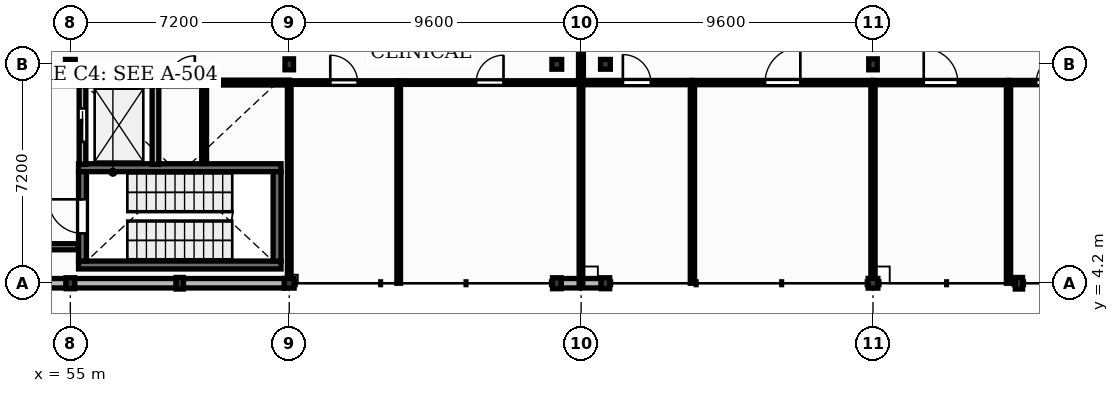
"""IFC4 building model, lengths in metres.
Left out: names, types, materials, properties, quantities, classifications, styles, units other than length and angle.
Written with IfcOpenShell. Run it as: python <this file> out.ifc"""

import sys

from ifc_helpers import new_model, si_unit, direction, frame, frame_2d, origin, origin_2d, place, context, subcontext, project, spatial, rectangle, extrude, element, fill, save


model = new_model("IFC4")
c1 = context("Model", 3, precision=1e-05, world=origin(), true_north=direction((0.0, 1.0)))
c2 = subcontext(c1, "Body", "Model", "MODEL_VIEW")
j1 = project(units=[si_unit("LENGTHUNIT", "METRE"), si_unit("PLANEANGLEUNIT", "RADIAN")], contexts=[c1])
p1 = place(None, origin())
s1 = spatial("IfcSite", under=j1, at=p1, CompositionType="ELEMENT")
p2 = place(p1, origin())
s2 = spatial("IfcBuilding", under=s1, at=p2, CompositionType="ELEMENT")
p3 = place(p2, frame((0.0, 0.0, 9.0)))
s3 = spatial("IfcBuildingStorey", under=s2, at=p3, CompositionType="ELEMENT", Elevation=9.0)
p4 = place(p3, frame((72.6, 4.2, 0.0), z_axis=(0.0, 0.0, 1.0), x_axis=(1.0, 0.0, 0.0)))
e1 = element("IfcColumn", 1, at=p4, inside=s3, PredefinedType="COLUMN", context=c2, shape_type="SweptSolid", body=[
    extrude(rectangle(XDim=0.28, YDim=0.36, at=origin_2d()), origin(), (0.0, 0.0, 1.0), 3.99),
])
for number, where, z_axis, x_axis in (
    (2, (72.6, 11.4, 0.0), (0.0, 0.0, 1.0), (1.0, 0.0, 0.0)),
    (3, (81.4, 4.2, 0.0), (0.0, 0.0, 1.0), (1.0, 0.0, 0.0)),
):
    element("IfcColumn", number, at=place(p3, frame(where, z_axis=z_axis, x_axis=x_axis)), inside=s3, PredefinedType="COLUMN", context=c2, shape_type="SweptSolid", body=[
        extrude(rectangle(XDim=0.32, YDim=0.32, at=origin_2d()), origin(), (0.0, 0.0, 1.0), 3.99),
    ])
for number, where, z_axis, x_axis in (
    (4, (81.4, 11.4, 0.0), (0.0, 0.0, 1.0), (1.0, 0.0, 0.0)),
    (5, (55.0, 4.2, 0.0), (0.0, 0.0, 1.0), (1.0, 0.0, 0.0)),
):
    element("IfcColumn", number, at=place(p3, frame(where, z_axis=z_axis, x_axis=x_axis)), inside=s3, PredefinedType="COLUMN", context=c2, shape_type="SweptSolid", body=[
        extrude(rectangle(XDim=0.28, YDim=0.36, at=origin_2d()), origin(), (0.0, 0.0, 1.0), 3.99),
    ])
for number, where, z_axis, x_axis in (
    (6, (55.0, 11.4, 0.0), (0.0, 0.0, 1.0), (1.0, 0.0, 0.0)),
    (7, (62.2, 4.2, 0.0), (0.0, 0.0, 1.0), (1.0, 0.0, 0.0)),
):
    element("IfcColumn", number, at=place(p3, frame(where, z_axis=z_axis, x_axis=x_axis)), inside=s3, PredefinedType="COLUMN", context=c2, shape_type="SweptSolid", body=[
        extrude(rectangle(XDim=0.32, YDim=0.32, at=origin_2d()), origin(), (0.0, 0.0, 1.0), 3.99),
    ])
for number, where, z_axis, x_axis in (
    (8, (62.2, 11.4, 0.0), (0.0, 0.0, 1.0), (1.0, 0.0, 0.0)),
    (9, (71.0, 4.2, 0.0), (0.0, 0.0, 1.0), (1.0, 0.0, 0.0)),
):
    element("IfcColumn", number, at=place(p3, frame(where, z_axis=z_axis, x_axis=x_axis)), inside=s3, PredefinedType="COLUMN", context=c2, shape_type="SweptSolid", body=[
        extrude(rectangle(XDim=0.28, YDim=0.36, at=origin_2d()), origin(), (0.0, 0.0, 1.0), 3.99),
    ])
p5 = place(p3, frame((71.0, 11.4, 0.0), z_axis=(0.0, 0.0, 1.0), x_axis=(1.0, 0.0, 0.0)))
e10 = element("IfcColumn", 10, at=p5, inside=s3, PredefinedType="COLUMN", context=c2, shape_type="SweptSolid", body=[
    extrude(rectangle(XDim=0.32, YDim=0.32, at=origin_2d()), origin(), (0.0, 0.0, 1.0), 3.99),
])
for number, where, z_axis, x_axis in (
    (11, (58.6, 4.2, 0.0), (0.0, 0.0, 1.0), (1.0, 0.0, 0.0)),
    (12, (86.2, 4.2, 0.0), (0.0, 0.0, 1.0), (1.0, 0.0, 0.0)),
):
    element("IfcColumn", number, at=place(p3, frame(where, z_axis=z_axis, x_axis=x_axis)), inside=s3, PredefinedType="PILASTER", context=c2, shape_type="SweptSolid", body=[
        extrude(rectangle(XDim=0.24, YDim=0.38, at=origin_2d()), origin(), (0.0, 0.0, 1.0), 3.99),
    ])
p6 = place(p3, frame((51.52, 4.2, 0.0), z_axis=(0.0, 0.0, 1.0), x_axis=(1.0, 0.0, 0.0)))
e13 = element("IfcWall", 13, at=p6, inside=s3, PredefinedType="SOLIDWALL", context=c2, shape_type="SweptSolid", body=[
    extrude(rectangle(XDim=3.34, YDim=0.31, at=frame_2d((1.67, 0.0))), origin(), (0.0, 0.0, 1.0), 3.53),
])
p7 = place(p6, frame((0.83, 0.0, 1.5)))
e14 = element("IfcOpeningElement", 14, at=p7, cuts=e13, PredefinedType="OPENING", context=c2, shape_type="SweptSolid", body=[
    extrude(rectangle(XDim=1.68, YDim=1.25, at=frame_2d((0.84, 0.625))), frame((0.0, 0.165, 0.0), z_axis=(0.0, -1.0, 0.0), x_axis=(1.0, 0.0, 0.0)), (0.0, 0.0, 1.0), 0.33),
])
p8 = place(p3, frame((55.14, 4.2, 0.0), z_axis=(0.0, 0.0, 1.0), x_axis=(1.0, 0.0, 0.0)))
e15 = element("IfcWall", 15, at=p8, inside=s3, PredefinedType="SOLIDWALL", context=c2, shape_type="SweptSolid", body=[
    extrude(rectangle(XDim=3.34, YDim=0.31, at=frame_2d((1.67, 0.0))), origin(), (0.0, 0.0, 1.0), 3.53),
])
p9 = place(p3, frame((58.72, 4.2, 0.0), z_axis=(0.0, 0.0, 1.0), x_axis=(1.0, 0.0, 0.0)))
e16 = element("IfcWall", 16, at=p9, inside=s3, PredefinedType="SOLIDWALL", context=c2, shape_type="SweptSolid", body=[
    extrude(rectangle(XDim=3.32, YDim=0.31, at=frame_2d((1.66, 0.0))), origin(), (0.0, 0.0, 1.0), 3.53),
])
p10 = place(p3, frame((71.14, 4.2, 0.0), z_axis=(0.0, 0.0, 1.0), x_axis=(1.0, 0.0, 0.0)))
e17 = element("IfcWall", 17, at=p10, inside=s3, PredefinedType="SOLIDWALL", context=c2, shape_type="SweptSolid", body=[
    extrude(rectangle(XDim=0.615, YDim=0.31, at=frame_2d((0.308, 0.0))), origin(), (0.0, 0.0, 1.0), 3.99),
])
p11 = place(p3, frame((71.805, 4.2, 0.0), z_axis=(0.0, 0.0, 1.0), x_axis=(1.0, 0.0, 0.0)))
e18 = element("IfcWall", 18, at=p11, inside=s3, PredefinedType="SOLIDWALL", context=c2, shape_type="SweptSolid", body=[
    extrude(rectangle(XDim=0.655, YDim=0.31, at=frame_2d((0.328, 0.0))), origin(), (0.0, 0.0, 1.0), 3.99),
])
for number, where, z_axis, x_axis in (
    (19, (55.27, 4.8, 0.0), (0.0, 0.0, 1.0), (1.0, 0.0, 0.0)),
    (20, (55.27, 8.0, 0.0), (0.0, 0.0, 1.0), (1.0, 0.0, 0.0)),
):
    element("IfcWall", number, at=place(p3, frame(where, z_axis=z_axis, x_axis=x_axis)), inside=s3, PredefinedType="SHEAR", context=c2, shape_type="SweptSolid", body=[
        extrude(rectangle(XDim=6.66, YDim=0.26, at=frame_2d((3.33, 0.0))), origin(), (0.0, 0.0, 1.0), 3.95),
    ])
p12 = place(p3, frame((55.4, 4.93, 0.0), z_axis=(0.0, 0.0, 1.0), x_axis=(0.0, 1.0, 0.0)))
e21 = element("IfcWall", 21, at=p12, inside=s3, PredefinedType="SHEAR", context=c2, shape_type="SweptSolid", body=[
    extrude(rectangle(XDim=2.94, YDim=0.26, at=frame_2d((1.47, 0.0))), origin(), (0.0, 0.0, 1.0), 3.95),
])
p13 = place(p12, frame((0.91, 0.0, 0.0)))
e22 = element("IfcOpeningElement", 22, at=p13, cuts=e21, PredefinedType="OPENING", context=c2, shape_type="SweptSolid", body=[
    extrude(rectangle(XDim=1.12, YDim=2.1, at=frame_2d((0.56, 1.05))), frame((0.0, 0.14, 0.0), z_axis=(0.0, -1.0, 0.0), x_axis=(1.0, 0.0, 0.0)), (0.0, 0.0, 1.0), 0.28),
])
p14 = place(p3, frame((61.8, 4.93, 0.0), z_axis=(0.0, 0.0, 1.0), x_axis=(0.0, 1.0, 0.0)))
e23 = element("IfcWall", 23, at=p14, inside=s3, PredefinedType="SHEAR", context=c2, shape_type="SweptSolid", body=[
    extrude(rectangle(XDim=2.94, YDim=0.26, at=frame_2d((1.47, 0.0))), origin(), (0.0, 0.0, 1.0), 3.95),
])
p15 = place(p3, frame((55.4, 10.8, 0.0), z_axis=(0.0, 0.0, 1.0), x_axis=(1.0, 0.0, 0.0)))
e24 = element("IfcWall", 24, at=p15, inside=s3, PredefinedType="SOLIDWALL", context=c2, shape_type="SweptSolid", body=[
    extrude(rectangle(XDim=2.4, YDim=0.22, at=frame_2d((1.2, 0.0))), origin(), (0.0, 0.0, 1.0), 3.95),
])
p16 = place(p3, frame((55.4, 8.11, 0.0), z_axis=(0.0, 0.0, 1.0), x_axis=(0.0, 1.0, 0.0)))
e25 = element("IfcWall", 25, at=p16, inside=s3, PredefinedType="SOLIDWALL", context=c2, shape_type="SweptSolid", body=[
    extrude(rectangle(XDim=2.58, YDim=0.22, at=frame_2d((1.29, 0.0))), origin(), (0.0, 0.0, 1.0), 3.95),
])
p17 = place(p16, frame((0.74, 0.0, 0.0)))
e26 = element("IfcOpeningElement", 26, at=p17, cuts=e25, PredefinedType="OPENING", context=c2, shape_type="SweptSolid", body=[
    extrude(rectangle(XDim=1.1, YDim=2.15, at=frame_2d((0.55, 1.075))), frame((0.0, 0.12, 0.0), z_axis=(0.0, -1.0, 0.0), x_axis=(1.0, 0.0, 0.0)), (0.0, 0.0, 1.0), 0.24),
])
p18 = place(p3, frame((57.8, 8.11, 0.0), z_axis=(0.0, 0.0, 1.0), x_axis=(0.0, 1.0, 0.0)))
e27 = element("IfcWall", 27, at=p18, inside=s3, PredefinedType="SOLIDWALL", context=c2, shape_type="SweptSolid", body=[
    extrude(rectangle(XDim=2.58, YDim=0.22, at=frame_2d((1.29, 0.0))), origin(), (0.0, 0.0, 1.0), 3.95),
])
p19 = place(p3, frame((51.0, 10.8, 0.0), z_axis=(0.0, 0.0, 1.0), x_axis=(1.0, 0.0, 0.0)))
e28 = element("IfcWall", 28, at=p19, inside=s3, PredefinedType="PARTITIONING", context=c2, shape_type="SweptSolid", body=[
    extrude(rectangle(XDim=4.29, YDim=0.2, at=frame_2d((2.145, 0.0))), origin(), (0.0, 0.0, 1.0), 3.96),
])
p20 = place(p19, frame((1.405, 0.0, 0.0)))
e29 = element("IfcOpeningElement", 29, at=p20, cuts=e28, PredefinedType="OPENING", context=c2, shape_type="SweptSolid", body=[
    extrude(rectangle(XDim=1.48, YDim=2.25, at=frame_2d((0.74, 1.125))), frame((0.0, 0.11, 0.0), z_axis=(0.0, -1.0, 0.0), x_axis=(1.0, 0.0, 0.0)), (0.0, 0.0, 1.0), 0.22),
])
p21 = place(p3, frame((57.91, 10.8, 0.0), z_axis=(0.0, 0.0, 1.0), x_axis=(1.0, 0.0, 0.0)))
e30 = element("IfcWall", 30, at=p21, inside=s3, PredefinedType="SOLIDWALL", context=c2, shape_type="SweptSolid", body=[
    extrude(rectangle(XDim=1.49, YDim=0.22, at=frame_2d((0.745, 0.0))), origin(), (0.0, 0.0, 1.0), 3.96),
])
p22 = place(p21, frame((0.305, 0.0, 0.0)))
e31 = element("IfcOpeningElement", 31, at=p22, cuts=e30, PredefinedType="OPENING", context=c2, shape_type="SweptSolid", body=[
    extrude(rectangle(XDim=0.88, YDim=2.05, at=frame_2d((0.44, 1.025))), frame((0.0, 0.12, 0.0), z_axis=(0.0, -1.0, 0.0), x_axis=(1.0, 0.0, 0.0)), (0.0, 0.0, 1.0), 0.24),
])
p23 = place(p3, frame((62.2, 10.8, 0.0), z_axis=(0.0, 0.0, 1.0), x_axis=(1.0, 0.0, 0.0)))
e32 = element("IfcWall", 32, at=p23, inside=s3, PredefinedType="PLUMBINGWALL", context=c2, shape_type="SweptSolid", body=[
    extrude(rectangle(XDim=3.6, YDim=0.12, at=frame_2d((1.8, 0.0))), origin(), (0.0, 0.0, 1.0), 3.96),
])
p24 = place(p23, frame((1.35, 0.0, 0.0)))
e33 = element("IfcOpeningElement", 33, at=p24, cuts=e32, PredefinedType="OPENING", context=c2, shape_type="SweptSolid", body=[
    extrude(rectangle(XDim=0.9, YDim=2.1, at=frame_2d((0.45, 1.05))), frame((0.0, 0.07, 0.0), z_axis=(0.0, -1.0, 0.0), x_axis=(1.0, 0.0, 0.0)), (0.0, 0.0, 1.0), 0.14),
])
p25 = place(p3, frame((65.8, 4.2, 0.0), z_axis=(0.0, 0.0, 1.0), x_axis=(0.0, 1.0, 0.0)))
e34 = element("IfcWall", 34, at=p25, inside=s3, PredefinedType="PLUMBINGWALL", context=c2, shape_type="SweptSolid", body=[
    extrude(rectangle(XDim=6.53, YDim=0.12, at=frame_2d((3.265, 0.0))), origin(), (0.0, 0.0, 1.0), 3.96),
])
p26 = place(p3, frame((65.8, 10.8, 0.0), z_axis=(0.0, 0.0, 1.0), x_axis=(1.0, 0.0, 0.0)))
e35 = element("IfcWall", 35, at=p26, inside=s3, PredefinedType="PLUMBINGWALL", context=c2, shape_type="SweptSolid", body=[
    extrude(rectangle(XDim=5.995, YDim=0.12, at=frame_2d((2.998, 0.0))), origin(), (0.0, 0.0, 1.0), 3.96),
])
p27 = place(p26, frame((2.548, 0.0, 0.0)))
e36 = element("IfcOpeningElement", 36, at=p27, cuts=e35, PredefinedType="OPENING", context=c2, shape_type="SweptSolid", body=[
    extrude(rectangle(XDim=0.9, YDim=2.1, at=frame_2d((0.45, 1.05))), frame((0.0, 0.07, 0.0), z_axis=(0.0, -1.0, 0.0), x_axis=(1.0, 0.0, 0.0)), (0.0, 0.0, 1.0), 0.14),
])
p28 = place(p3, frame((71.805, 10.8, 0.0), z_axis=(0.0, 0.0, 1.0), x_axis=(1.0, 0.0, 0.0)))
e37 = element("IfcWall", 37, at=p28, inside=s3, PredefinedType="PARTITIONING", context=c2, shape_type="SweptSolid", body=[
    extrude(rectangle(XDim=3.656, YDim=0.14, at=frame_2d((1.828, 0.0))), origin(), (0.0, 0.0, 1.0), 3.96),
])
p29 = place(p28, frame((1.368, 0.0, 0.0)))
e38 = element("IfcOpeningElement", 38, at=p29, cuts=e37, PredefinedType="OPENING", context=c2, shape_type="SweptSolid", body=[
    extrude(rectangle(XDim=0.92, YDim=2.1, at=frame_2d((0.46, 1.05))), frame((0.0, 0.08, 0.0), z_axis=(0.0, -1.0, 0.0), x_axis=(1.0, 0.0, 0.0)), (0.0, 0.0, 1.0), 0.16),
])
p30 = place(p3, frame((75.461, 4.2, 0.0), z_axis=(0.0, 0.0, 1.0), x_axis=(0.0, 1.0, 0.0)))
e39 = element("IfcWall", 39, at=p30, inside=s3, PredefinedType="PARTITIONING", context=c2, shape_type="SweptSolid", body=[
    extrude(rectangle(XDim=6.53, YDim=0.14, at=frame_2d((3.265, 0.0))), origin(), (0.0, 0.0, 1.0), 3.96),
])
p31 = place(p3, frame((75.461, 10.8, 0.0), z_axis=(0.0, 0.0, 1.0), x_axis=(1.0, 0.0, 0.0)))
e40 = element("IfcWall", 40, at=p31, inside=s3, PredefinedType="PARTITIONING", context=c2, shape_type="SweptSolid", body=[
    extrude(rectangle(XDim=5.939, YDim=0.14, at=frame_2d((2.969, 0.0))), origin(), (0.0, 0.0, 1.0), 3.96),
])
p32 = place(p31, frame((2.389, 0.0, 0.0)))
e41 = element("IfcOpeningElement", 41, at=p32, cuts=e40, PredefinedType="OPENING", context=c2, shape_type="SweptSolid", body=[
    extrude(rectangle(XDim=1.16, YDim=2.1, at=frame_2d((0.58, 1.05))), frame((0.0, 0.08, 0.0), z_axis=(0.0, -1.0, 0.0), x_axis=(1.0, 0.0, 0.0)), (0.0, 0.0, 1.0), 0.16),
])
p33 = place(p3, frame((81.4, 4.36, 0.0), z_axis=(0.0, 0.0, 1.0), x_axis=(0.0, 1.0, 0.0)))
e42 = element("IfcWall", 42, at=p33, inside=s3, PredefinedType="PARTITIONING", context=c2, shape_type="SweptSolid", body=[
    extrude(rectangle(XDim=6.37, YDim=0.14, at=frame_2d((3.185, 0.0))), origin(), (0.0, 0.0, 1.0), 3.47),
])
p34 = place(p3, frame((81.4, 10.8, 0.0), z_axis=(0.0, 0.0, 1.0), x_axis=(1.0, 0.0, 0.0)))
e43 = element("IfcWall", 43, at=p34, inside=s3, PredefinedType="PARTITIONING", context=c2, shape_type="SweptSolid", body=[
    extrude(rectangle(XDim=4.457, YDim=0.14, at=frame_2d((2.229, 0.0))), origin(), (0.0, 0.0, 1.0), 3.96),
])
p35 = place(p34, frame((1.668, 0.0, 0.0)))
e44 = element("IfcOpeningElement", 44, at=p35, cuts=e43, PredefinedType="OPENING", context=c2, shape_type="SweptSolid", body=[
    extrude(rectangle(XDim=1.12, YDim=2.15, at=frame_2d((0.56, 1.075))), frame((0.0, 0.08, 0.0), z_axis=(0.0, -1.0, 0.0), x_axis=(1.0, 0.0, 0.0)), (0.0, 0.0, 1.0), 0.16),
])
p36 = place(p3, frame((85.857, 4.2, 0.0), z_axis=(0.0, 0.0, 1.0), x_axis=(0.0, 1.0, 0.0)))
e45 = element("IfcWall", 45, at=p36, inside=s3, PredefinedType="PARTITIONING", context=c2, shape_type="SweptSolid", body=[
    extrude(rectangle(XDim=6.53, YDim=0.14, at=frame_2d((3.265, 0.0))), origin(), (0.0, 0.0, 1.0), 3.96),
])
p37 = place(p3, frame((85.857, 10.8, 0.0), z_axis=(0.0, 0.0, 1.0), x_axis=(1.0, 0.0, 0.0)))
e46 = element("IfcWall", 46, at=p37, inside=s3, PredefinedType="PARTITIONING", context=c2, shape_type="SweptSolid", body=[
    extrude(rectangle(XDim=2.743, YDim=0.14, at=frame_2d((1.372, 0.0))), origin(), (0.0, 0.0, 1.0), 3.96),
])
p38 = place(p37, frame((0.912, 0.0, 0.0)))
e47 = element("IfcOpeningElement", 47, at=p38, cuts=e46, PredefinedType="OPENING", context=c2, shape_type="SweptSolid", body=[
    extrude(rectangle(XDim=0.92, YDim=2.1, at=frame_2d((0.46, 1.05))), frame((0.0, 0.08, 0.0), z_axis=(0.0, -1.0, 0.0), x_axis=(1.0, 0.0, 0.0)), (0.0, 0.0, 1.0), 0.16),
])
p39 = place(p3, frame((59.4, 8.14, 0.0), z_axis=(0.0, 0.0, 1.0), x_axis=(0.0, 1.0, 0.0)))
e48 = element("IfcWall", 48, at=p39, inside=s3, PredefinedType="PARTITIONING", context=c2, shape_type="SweptSolid", body=[
    extrude(rectangle(XDim=2.59, YDim=0.16, at=frame_2d((1.295, 0.0))), origin(), (0.0, 0.0, 1.0), 3.96),
])
p40 = place(p3, frame((51.0, 5.4, 0.0), z_axis=(0.0, 0.0, 1.0), x_axis=(1.0, 0.0, 0.0)))
e49 = element("IfcWall", 49, at=p40, inside=s3, PredefinedType="PARTITIONING", context=c2, shape_type="SweptSolid", body=[
    extrude(rectangle(XDim=4.26, YDim=0.2, at=frame_2d((2.13, 0.0))), origin(), (0.0, 0.0, 1.0), 3.96),
])
p41 = place(p3, frame((59.4, 10.8, 0.0), z_axis=(0.0, 0.0, 1.0), x_axis=(1.0, 0.0, 0.0)))
e50 = element("IfcWall", 50, at=p41, inside=s3, PredefinedType="PARTITIONING", context=c2, shape_type="SweptSolid", body=[
    extrude(rectangle(XDim=2.8, YDim=0.16, at=frame_2d((1.4, 0.0))), origin(), (0.0, 0.0, 1.0), 3.96),
])
p42 = place(p3, frame((71.795, 10.87, 0.0), z_axis=(0.0, 0.0, 1.0), x_axis=(0.0, 1.0, 0.0)))
e51 = element("IfcWall", 51, at=p42, inside=s3, PredefinedType="PARTITIONING", context=c2, shape_type="SweptSolid", body=[
    extrude(rectangle(XDim=2.46, YDim=0.16, at=frame_2d((1.23, 0.0))), origin(), (0.0, 0.0, 1.0), 3.96),
])
p43 = place(p3, frame((62.2, 4.36, 0.0), z_axis=(0.0, 0.0, 1.0), x_axis=(0.0, 1.0, 0.0)))
e52 = element("IfcWall", 52, at=p43, inside=s3, PredefinedType="PLUMBINGWALL", context=c2, shape_type="SweptSolid", body=[
    extrude(rectangle(XDim=6.37, YDim=0.12, at=frame_2d((3.185, 0.0))), origin(), (0.0, 0.0, 1.0), 3.47),
])
p44 = place(p3, frame((71.795, 4.2, 0.0), z_axis=(0.0, 0.0, 1.0), x_axis=(0.0, 1.0, 0.0)))
e53 = element("IfcWall", 53, at=p44, inside=s3, PredefinedType="PLUMBINGWALL", context=c2, shape_type="SweptSolid", body=[
    extrude(rectangle(XDim=6.53, YDim=0.12, at=frame_2d((3.265, 0.0))), origin(), (0.0, 0.0, 1.0), 3.96),
])
p45 = place(p17, origin())
e54 = element("IfcDoor", 54, at=p45, inside=s3, OperationType="SLIDING_TO_LEFT", PredefinedType="DOOR", context=c2, shape_type="SweptSolid", body=[
    extrude(rectangle(XDim=1.1, YDim=2.15, at=frame_2d((0.55, 1.075))), frame((0.0, 0.025, 0.0), z_axis=(0.0, -1.0, 0.0), x_axis=(1.0, 0.0, 0.0)), (0.0, 0.0, 1.0), 0.05),
])
fill(e26, e54)
p46 = place(p13, origin())
e55 = element("IfcDoor", 55, at=p46, inside=s3, OperationType="SINGLE_SWING_RIGHT", PredefinedType="DOOR", context=c2, shape_type="SweptSolid", body=[
    extrude(rectangle(XDim=1.12, YDim=2.1, at=frame_2d((0.56, 1.05))), frame((0.0, 0.025, 0.0), z_axis=(0.0, -1.0, 0.0), x_axis=(1.0, 0.0, 0.0)), (0.0, 0.0, 1.0), 0.05),
])
fill(e22, e55)
p47 = place(p22, origin())
e56 = element("IfcDoor", 56, at=p47, inside=s3, OperationType="SINGLE_SWING_RIGHT", PredefinedType="DOOR", context=c2, shape_type="SweptSolid", body=[
    extrude(rectangle(XDim=0.88, YDim=2.05, at=frame_2d((0.44, 1.025))), frame((0.0, 0.025, 0.0), z_axis=(0.0, -1.0, 0.0), x_axis=(1.0, 0.0, 0.0)), (0.0, 0.0, 1.0), 0.05),
])
fill(e31, e56)
p48 = place(p24, origin())
e57 = element("IfcDoor", 57, at=p48, inside=s3, OperationType="SINGLE_SWING_LEFT", PredefinedType="DOOR", context=c2, shape_type="SweptSolid", body=[
    extrude(rectangle(XDim=0.9, YDim=2.1, at=frame_2d((0.45, 1.05))), frame((0.0, 0.025, 0.0), z_axis=(0.0, -1.0, 0.0), x_axis=(1.0, 0.0, 0.0)), (0.0, 0.0, 1.0), 0.05),
])
fill(e33, e57)
p49 = place(p27, origin())
e58 = element("IfcDoor", 58, at=p49, inside=s3, OperationType="SINGLE_SWING_RIGHT", PredefinedType="DOOR", context=c2, shape_type="SweptSolid", body=[
    extrude(rectangle(XDim=0.9, YDim=2.1, at=frame_2d((0.45, 1.05))), frame((0.0, 0.025, 0.0), z_axis=(0.0, -1.0, 0.0), x_axis=(1.0, 0.0, 0.0)), (0.0, 0.0, 1.0), 0.05),
])
fill(e36, e58)
p50 = place(p29, origin())
e59 = element("IfcDoor", 59, at=p50, inside=s3, OperationType="SINGLE_SWING_LEFT", PredefinedType="DOOR", context=c2, shape_type="SweptSolid", body=[
    extrude(rectangle(XDim=0.92, YDim=2.1, at=frame_2d((0.46, 1.05))), frame((0.0, 0.025, 0.0), z_axis=(0.0, -1.0, 0.0), x_axis=(1.0, 0.0, 0.0)), (0.0, 0.0, 1.0), 0.05),
])
fill(e38, e59)
p51 = place(p32, origin())
e60 = element("IfcDoor", 60, at=p51, inside=s3, OperationType="SINGLE_SWING_RIGHT", PredefinedType="DOOR", context=c2, shape_type="SweptSolid", body=[
    extrude(rectangle(XDim=1.16, YDim=2.1, at=frame_2d((0.58, 1.05))), frame((0.0, 0.025, 0.0), z_axis=(0.0, -1.0, 0.0), x_axis=(1.0, 0.0, 0.0)), (0.0, 0.0, 1.0), 0.05),
])
fill(e41, e60)
p52 = place(p35, origin())
e61 = element("IfcDoor", 61, at=p52, inside=s3, OperationType="SINGLE_SWING_LEFT", PredefinedType="DOOR", context=c2, shape_type="SweptSolid", body=[
    extrude(rectangle(XDim=1.12, YDim=2.15, at=frame_2d((0.56, 1.075))), frame((0.0, 0.025, 0.0), z_axis=(0.0, -1.0, 0.0), x_axis=(1.0, 0.0, 0.0)), (0.0, 0.0, 1.0), 0.05),
])
fill(e44, e61)
p53 = place(p38, origin())
e62 = element("IfcDoor", 62, at=p53, inside=s3, OperationType="SINGLE_SWING_RIGHT", PredefinedType="DOOR", context=c2, shape_type="SweptSolid", body=[
    extrude(rectangle(XDim=0.92, YDim=2.1, at=frame_2d((0.46, 1.05))), frame((0.0, 0.025, 0.0), z_axis=(0.0, -1.0, 0.0), x_axis=(1.0, 0.0, 0.0)), (0.0, 0.0, 1.0), 0.05),
])
fill(e47, e62)
save(model, sys.argv[1])
